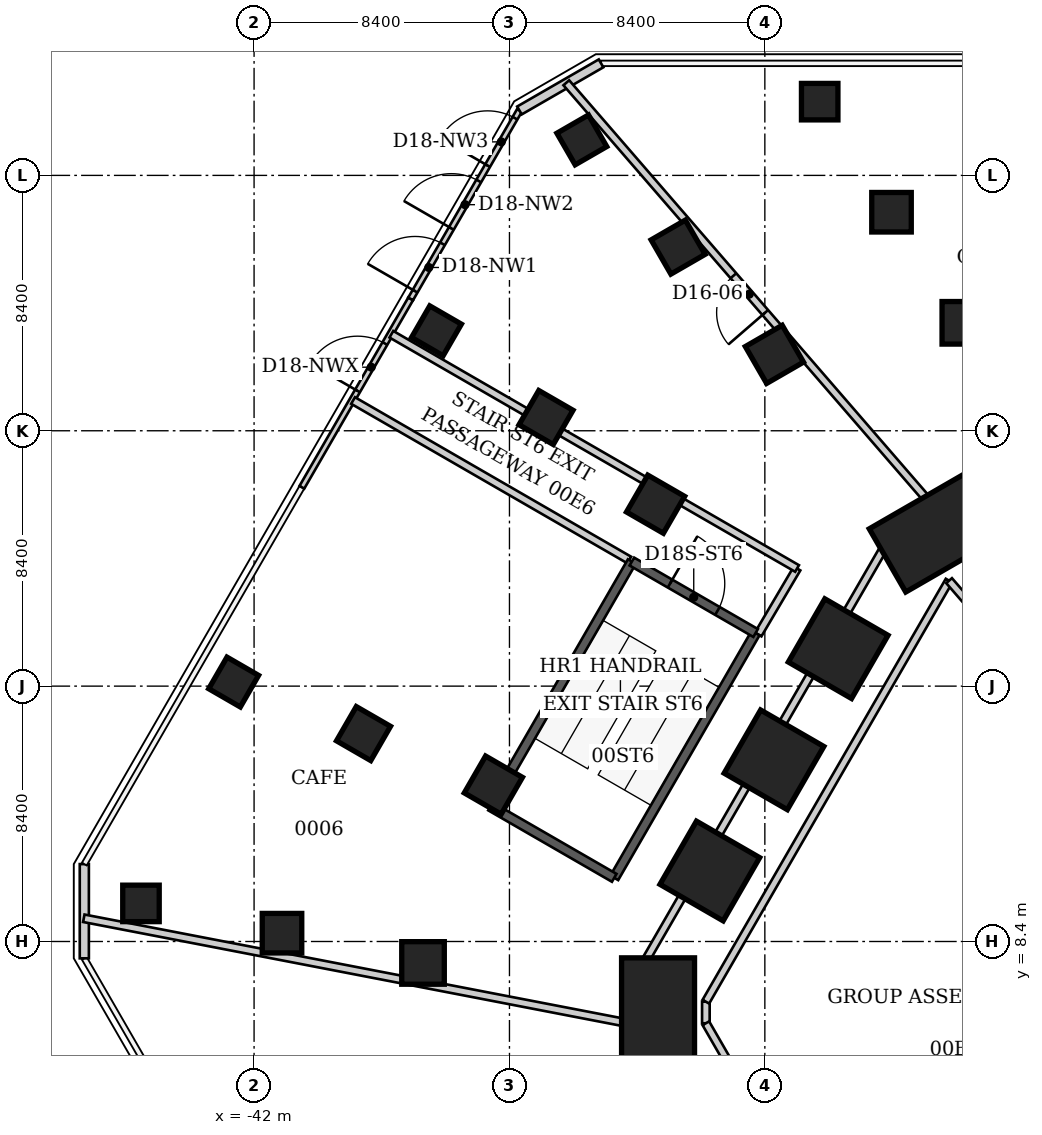
"""IFC4 building model, lengths in metres.
Left out: names, types, materials, properties, quantities, classifications, styles, units other than length and angle.
Written with IfcOpenShell. Run it as: python <this file> out.ifc"""

import sys

from ifc_helpers import new_model, si_unit, direction, frame, frame_2d, origin, origin_2d, place, context, subcontext, project, spatial, rectangle, extrude, element, fill, save


model = new_model("IFC4")
c1 = context("Model", 3, precision=1e-05, world=origin(), true_north=direction((0.0, 1.0)))
c2 = subcontext(c1, "Body", "Model", "MODEL_VIEW")
j1 = project(units=[si_unit("LENGTHUNIT", "METRE"), si_unit("PLANEANGLEUNIT", "RADIAN")], contexts=[c1])
p1 = place(None, origin())
s1 = spatial("IfcSite", under=j1, at=p1, CompositionType="ELEMENT")
p2 = place(p1, origin())
s2 = spatial("IfcBuilding", under=s1, at=p2, CompositionType="ELEMENT")
p3 = place(p2, origin())
s3 = spatial("IfcBuildingStorey", under=s2, at=p3, CompositionType="ELEMENT", Elevation=0.0)
p4 = place(p3, frame((-28.713, 6.062, -0.2), z_axis=(0.0, 0.0, 1.0), x_axis=(-1.0, 0.0, 0.0)))
e1 = element("IfcColumn", 1, at=p4, inside=s3, PredefinedType="COLUMN", context=c2, shape_type="SweptSolid", body=[
    extrude(rectangle(XDim=2.4, YDim=3.6, at=origin_2d()), origin(), (0.0, 0.0, 1.0), 6.2),
])
for number, where, z_axis, x_axis in (
    (2, (-27.01, 10.719, -0.2), (0.0, 0.0, 1.0), (-0.866, 0.5, 0.0)),
    (3, (-24.899, 14.375, -0.2), (0.0, 0.0, 1.0), (-0.866, 0.5, 0.0)),
    (4, (-22.788, 18.032, -0.2), (0.0, 0.0, 1.0), (-0.866, 0.5, 0.0)),
):
    element("IfcColumn", number, at=place(p3, frame(where, z_axis=z_axis, x_axis=x_axis)), inside=s3, PredefinedType="COLUMN", context=c2, shape_type="SweptSolid", body=[
        extrude(rectangle(XDim=2.4, YDim=2.4, at=origin_2d()), origin(), (0.0, 0.0, 1.0), 6.2),
    ])
p5 = place(p3, frame((-19.606, 21.835, -0.2), z_axis=(0.0, 0.0, 1.0), x_axis=(-0.5, 0.866025403784, 0.0)))
e5 = element("IfcColumn", 5, at=p5, inside=s3, PredefinedType="COLUMN", context=c2, shape_type="SweptSolid", body=[
    extrude(rectangle(XDim=2.4, YDim=3.6, at=origin_2d()), origin(), (0.0, 0.0, 1.0), 6.2),
])
for number, where, z_axis, x_axis in (
    (6, (-18.672, 28.751, -0.2), (0.0, 0.0, 1.0), (0.0, 1.0, 0.0)),
    (7, (-36.443, 7.694, -0.2), (0.0, 0.0, 1.0), (-1.0, 0.0, 0.0)),
    (8, (-34.129, 13.544, -0.2), (0.0, 0.0, 1.0), (-0.866, 0.5, 0.0)),
    (9, (-28.794, 22.785, -0.2), (0.0, 0.0, 1.0), (-0.866, 0.5, 0.0)),
    (10, (-24.885, 27.714, -0.2), (0.0, 0.0, 1.0), (-0.5, 0.866, 0.0)),
):
    element("IfcColumn", number, at=place(p3, frame(where, z_axis=z_axis, x_axis=x_axis)), inside=s3, PredefinedType="COLUMN", context=c2, shape_type="SweptSolid", body=[
        extrude(rectangle(XDim=1.4, YDim=1.4, at=origin_2d()), origin(), (0.0, 0.0, 1.0), 6.2),
    ])
for number, where, z_axis, x_axis in (
    (11, (-21.034, 32.388, -0.2), (0.0, 0.0, 1.0), (0.0, 1.0, 0.0)),
    (12, (-41.082, 8.674, -0.2), (0.0, 0.0, 1.0), (-1.0, 0.0, 0.0)),
    (13, (-38.4, 15.239, -0.2), (0.0, 0.0, 1.0), (-0.866, 0.5, 0.0)),
    (14, (-32.397, 25.636, -0.2), (0.0, 0.0, 1.0), (-0.866, 0.5, 0.0)),
    (15, (-28.052, 31.241, -0.2), (0.0, 0.0, 1.0), (-0.5, 0.866, 0.0)),
):
    element("IfcColumn", number, at=place(p3, frame(where, z_axis=z_axis, x_axis=x_axis)), inside=s3, PredefinedType="COLUMN", context=c2, shape_type="SweptSolid", body=[
        extrude(rectangle(XDim=1.3, YDim=1.3, at=origin_2d()), origin(), (0.0, 0.0, 1.0), 6.2),
    ])
for number, where, z_axis, x_axis in (
    (16, (-23.396, 36.025, -0.2), (0.0, 0.0, 1.0), (0.0, 1.0, 0.0)),
    (17, (-45.72, 9.653, -0.2), (0.0, 0.0, 1.0), (-1.0, 0.0, 0.0)),
    (18, (-42.672, 16.934, -0.2), (0.0, 0.0, 1.0), (-0.866, 0.5, 0.0)),
    (19, (-36.001, 28.488, -0.2), (0.0, 0.0, 1.0), (-0.866, 0.5, 0.0)),
    (20, (-31.22, 34.768, -0.2), (0.0, 0.0, 1.0), (-0.5, 0.866, 0.0)),
):
    element("IfcColumn", number, at=place(p3, frame(where, z_axis=z_axis, x_axis=x_axis)), inside=s3, PredefinedType="COLUMN", context=c2, shape_type="SweptSolid", body=[
        extrude(rectangle(XDim=1.2, YDim=1.2, at=origin_2d()), origin(), (0.0, 0.0, 1.0), 6.2),
    ])
p6 = place(p3, frame((-47.584, 7.846, 0.0), z_axis=(0.0, 0.0, 1.0), x_axis=(0.0, 1.0, 0.0)))
e21 = element("IfcWall", 21, at=p6, inside=s3, PredefinedType="SOLIDWALL", context=c2, shape_type="SweptSolid", body=[
    extrude(rectangle(XDim=3.1, YDim=0.3, at=frame_2d((1.55, 0.0))), origin(), (0.0, 0.0, 1.0), 5.84),
])
p7 = place(p3, frame((-40.428, 23.341, 0.0), z_axis=(0.0, 0.0, 1.0), x_axis=(0.49999906395, 0.866025944212, 0.0)))
e22 = element("IfcWall", 22, at=p7, inside=s3, PredefinedType="SOLIDWALL", context=c2, shape_type="SweptSolid", body=[
    extrude(rectangle(XDim=7.156, YDim=0.18, at=frame_2d((3.578, 0.0))), origin(), (0.0, 0.0, 1.0), 5.84),
])
p8 = place(p7, frame((3.661, 0.0, 0.0)))
e23 = element("IfcOpeningElement", 23, at=p8, cuts=e22, PredefinedType="OPENING", context=c2, shape_type="SweptSolid", body=[
    extrude(rectangle(XDim=1.8, YDim=2.7, at=frame_2d((0.9, 1.35))), frame((0.0, 0.09, 0.0), z_axis=(0.0, -1.0, 0.0), x_axis=(1.0, 0.0, 0.0)), (0.0, 0.0, 1.0), 0.18),
])
p9 = place(p3, frame((-36.85, 29.538, 0.0), z_axis=(0.0, 0.0, 1.0), x_axis=(0.499988249127, 0.866032188048, 0.0)))
e24 = element("IfcWall", 24, at=p9, inside=s3, PredefinedType="SOLIDWALL", context=c2, shape_type="SweptSolid", body=[
    extrude(rectangle(XDim=7.156, YDim=0.18, at=frame_2d((3.578, 0.0))), origin(), (0.0, 0.0, 1.0), 5.84),
])
p10 = place(p9, frame((0.293, 0.0, 0.0)))
e25 = element("IfcOpeningElement", 25, at=p10, cuts=e24, PredefinedType="OPENING", context=c2, shape_type="SweptSolid", body=[
    extrude(rectangle(XDim=1.8, YDim=2.7, at=frame_2d((0.9, 1.35))), frame((0.0, 0.09, 0.0), z_axis=(0.0, -1.0, 0.0), x_axis=(1.0, 0.0, 0.0)), (0.0, 0.0, 1.0), 0.18),
])
p11 = place(p9, frame((2.678, 0.0, 0.0)))
e26 = element("IfcOpeningElement", 26, at=p11, cuts=e24, PredefinedType="OPENING", context=c2, shape_type="SweptSolid", body=[
    extrude(rectangle(XDim=1.8, YDim=2.7, at=frame_2d((0.9, 1.35))), frame((0.0, 0.09, 0.0), z_axis=(0.0, -1.0, 0.0), x_axis=(1.0, 0.0, 0.0)), (0.0, 0.0, 1.0), 0.18),
])
p12 = place(p9, frame((5.063, 0.0, 0.0)))
e27 = element("IfcOpeningElement", 27, at=p12, cuts=e24, PredefinedType="OPENING", context=c2, shape_type="SweptSolid", body=[
    extrude(rectangle(XDim=1.8, YDim=2.7, at=frame_2d((0.9, 1.35))), frame((0.0, 0.09, 0.0), z_axis=(0.0, -1.0, 0.0), x_axis=(1.0, 0.0, 0.0)), (0.0, 0.0, 1.0), 0.18),
])
p13 = place(p3, frame((-33.272, 35.736, 0.0), z_axis=(0.0, 0.0, 1.0), x_axis=(0.866063626216, 0.499933790963, 0.0)))
e28 = element("IfcWall", 28, at=p13, inside=s3, PredefinedType="SOLIDWALL", context=c2, shape_type="SweptSolid", body=[
    extrude(rectangle(XDim=3.1, YDim=0.3, at=frame_2d((1.55, 0.0))), origin(), (0.0, 0.0, 1.0), 5.84),
])
p14 = place(p3, frame((-29.659, 20.948, 0.0), z_axis=(0.0, 0.0, 1.0), x_axis=(-0.865956906552, 0.500118621924, 0.0)))
e29 = element("IfcWall", 29, at=p14, inside=s3, PredefinedType="PARTITIONING", context=c2, shape_type="SweptSolid", body=[
    extrude(rectangle(XDim=10.491, YDim=0.25, at=frame_2d((5.245, 0.0))), origin(), (0.0, 0.0, 1.0), 5.75),
])
p15 = place(p3, frame((-29.54, 5.06, 0.0), z_axis=(0.0, 0.0, 1.0), x_axis=(0.500237574973, -0.865888196354, 0.0)))
e30 = element("IfcWall", 30, at=p15, inside=s3, PredefinedType="PARTITIONING", context=c2, shape_type="SweptSolid", body=[
    extrude(rectangle(XDim=15.753, YDim=0.25, at=frame_2d((7.876, 0.0))), origin(), (0.0, 0.0, 1.0), 4.04),
])
p16 = place(p15, frame((5.726, 0.0, 0.0)))
e31 = element("IfcOpeningElement", 31, at=p16, cuts=e30, PredefinedType="OPENING", context=c2, shape_type="SweptSolid", body=[
    extrude(rectangle(XDim=1.6, YDim=2.4, at=frame_2d((0.8, 1.2))), frame((0.0, 0.125, 0.0), z_axis=(0.0, -1.0, 0.0), x_axis=(1.0, 0.0, 0.0)), (0.0, 0.0, 1.0), 0.25),
])
p17 = place(p3, frame((-29.54, 5.645, 0.0), z_axis=(0.0, 0.0, 1.0), x_axis=(0.0, -1.0, 0.0)))
e32 = element("IfcWall", 32, at=p17, inside=s3, PredefinedType="PARTITIONING", context=c2, shape_type="SweptSolid", body=[
    extrude(rectangle(XDim=0.585, YDim=0.25, at=frame_2d((0.292, 0.0))), origin(), (0.0, 0.0, 1.0), 5.84),
])
p18 = place(p3, frame((-29.54, 5.68, 0.0), z_axis=(0.0, 0.0, 1.0), x_axis=(-0.981893421599, 0.189434180181, 0.0)))
e33 = element("IfcWall", 33, at=p18, inside=s3, PredefinedType="PARTITIONING", context=c2, shape_type="SweptSolid", body=[
    extrude(rectangle(XDim=18.394, YDim=0.25, at=frame_2d((9.197, 0.0))), origin(), (0.0, 0.0, 1.0), 5.75),
])
p19 = place(p3, frame((-29.54, 7.06, 0.0), z_axis=(0.0, 0.0, 1.0), x_axis=(0.0, -1.0, 0.0)))
e34 = element("IfcWall", 34, at=p19, inside=s3, PredefinedType="PARTITIONING", context=c2, shape_type="SweptSolid", body=[
    extrude(rectangle(XDim=1.38, YDim=0.25, at=frame_2d((0.69, 0.0))), origin(), (0.0, 0.0, 1.0), 5.84),
])
p20 = place(p3, frame((-27.14, 5.71, 0.0), z_axis=(0.0, 0.0, 1.0), x_axis=(0.0, 1.0, 0.0)))
e35 = element("IfcWall", 35, at=p20, inside=s3, PredefinedType="PARTITIONING", context=c2, shape_type="SweptSolid", body=[
    extrude(rectangle(XDim=0.71, YDim=0.25, at=frame_2d((0.355, 0.0))), origin(), (0.0, 0.0, 1.0), 5.84),
])
p21 = place(p3, frame((-27.14, 5.71, 0.0), z_axis=(0.0, 0.0, 1.0), x_axis=(0.499871788402, -0.866099414132, 0.0)))
e36 = element("IfcWall", 36, at=p21, inside=s3, PredefinedType="PARTITIONING", context=c2, shape_type="SweptSolid", body=[
    extrude(rectangle(XDim=23.257, YDim=0.25, at=frame_2d((11.628, 0.0))), origin(), (0.0, 0.0, 1.0), 5.84),
])
p22 = place(p21, frame((9.979, 0.0, 0.0)))
e37 = element("IfcOpeningElement", 37, at=p22, cuts=e36, PredefinedType="OPENING", context=c2, shape_type="SweptSolid", body=[
    extrude(rectangle(XDim=1.6, YDim=2.4, at=frame_2d((0.8, 1.2))), frame((0.0, 0.125, 0.0), z_axis=(0.0, -1.0, 0.0), x_axis=(1.0, 0.0, 0.0)), (0.0, 0.0, 1.0), 0.25),
])
p23 = place(p3, frame((-27.14, 6.42, 0.0), z_axis=(0.0, 0.0, 1.0), x_axis=(0.50017078562, 0.865926778205, 0.0)))
e38 = element("IfcWall", 38, at=p23, inside=s3, PredefinedType="PARTITIONING", context=c2, shape_type="SweptSolid", body=[
    extrude(rectangle(XDim=15.995, YDim=0.25, at=frame_2d((7.997, 0.0))), origin(), (0.0, 0.0, 1.0), 5.84),
])
p24 = place(p3, frame((-25.42, 18.5, 0.0), z_axis=(0.0, 0.0, 1.0), x_axis=(0.508082727165, 0.861308273707, 0.0)))
e39 = element("IfcWall", 39, at=p24, inside=s3, PredefinedType="PARTITIONING", context=c2, shape_type="SweptSolid", body=[
    extrude(rectangle(XDim=2.519, YDim=0.25, at=frame_2d((1.26, 0.0))), origin(), (0.0, 0.0, 1.0), 5.84),
])
p25 = place(p3, frame((-24.14, 20.67, 0.0), z_axis=(0.0, 0.0, 1.0), x_axis=(-0.866003524369, 0.500037894345, 0.0)))
e40 = element("IfcWall", 40, at=p25, inside=s3, PredefinedType="PARTITIONING", context=c2, shape_type="SweptSolid", body=[
    extrude(rectangle(XDim=15.409, YDim=0.25, at=frame_2d((7.705, 0.0))), origin(), (0.0, 0.0, 1.0), 5.083),
])
p26 = place(p3, frame((-20.88, 22.05, 0.0), z_axis=(0.0, 0.0, 1.0), x_axis=(-0.500246113481, -0.865883263464, 0.0)))
e41 = element("IfcWall", 41, at=p26, inside=s3, PredefinedType="PARTITIONING", context=c2, shape_type="SweptSolid", body=[
    extrude(rectangle(XDim=17.312, YDim=0.25, at=frame_2d((8.656, 0.0))), origin(), (0.0, 0.0, 1.0), 4.04),
])
p27 = place(p3, frame((-20.88, 22.05, 0.0), z_axis=(0.0, 0.0, 1.0), x_axis=(0.865786487168, 0.500413587582, 0.0)))
e42 = element("IfcWall", 42, at=p27, inside=s3, PredefinedType="PARTITIONING", context=c2, shape_type="SweptSolid", body=[
    extrude(rectangle(XDim=1.376, YDim=0.25, at=frame_2d((0.688, 0.0))), origin(), (0.0, 0.0, 1.0), 5.84),
])
p28 = place(p3, frame((-19.69, 22.74, 0.0), z_axis=(0.0, 0.0, 1.0), x_axis=(-0.654545432473, 0.75602266952, 0.0)))
e43 = element("IfcWall", 43, at=p28, inside=s3, PredefinedType="PARTITIONING", context=c2, shape_type="SweptSolid", body=[
    extrude(rectangle(XDim=18.395, YDim=0.25, at=frame_2d((9.198, 0.0))), origin(), (0.0, 0.0, 1.0), 5.75),
])
p29 = place(p28, frame((8.398, 0.0, 0.0)))
e44 = element("IfcOpeningElement", 44, at=p29, cuts=e43, PredefinedType="OPENING", context=c2, shape_type="SweptSolid", body=[
    extrude(rectangle(XDim=1.6, YDim=2.4, at=frame_2d((0.8, 1.2))), frame((0.0, 0.125, 0.0), z_axis=(0.0, -1.0, 0.0), x_axis=(1.0, 0.0, 0.0)), (0.0, 0.0, 1.0), 0.25),
])
p30 = place(p3, frame((-19.66, 22.757, 0.0), z_axis=(0.0, 0.0, 1.0), x_axis=(0.867193315, 0.497971640175, 0.0)))
e45 = element("IfcWall", 45, at=p30, inside=s3, PredefinedType="PARTITIONING", context=c2, shape_type="SweptSolid", body=[
    extrude(rectangle(XDim=0.588, YDim=0.25, at=frame_2d((0.294, 0.0))), origin(), (0.0, 0.0, 1.0), 5.84),
])
p31 = place(p3, frame((-19.14, 20.27, 0.0), z_axis=(0.0, 0.0, 1.0), x_axis=(0.654785227324, -0.755814994611, 0.0)))
e46 = element("IfcWall", 46, at=p31, inside=s3, PredefinedType="PARTITIONING", context=c2, shape_type="SweptSolid", body=[
    extrude(rectangle(XDim=13.562, YDim=0.25, at=frame_2d((6.781, 0.0))), origin(), (0.0, 0.0, 1.0), 5.84),
])
p32 = place(p3, frame((-4.0, 23.05, 0.0), z_axis=(0.0, 0.0, 1.0), x_axis=(-1.0, 0.0, 0.0)))
e47 = element("IfcWall", 47, at=p32, inside=s3, PredefinedType="PARTITIONING", context=c2, shape_type="SweptSolid", body=[
    extrude(rectangle(XDim=15.15, YDim=0.25, at=frame_2d((7.575, 0.0))), origin(), (0.0, 0.0, 1.0), 4.04),
])
p33 = place(p3, frame((-25.504, 18.548, 0.0), z_axis=(0.0, 0.0, 1.0), x_axis=(-0.500004225487, -0.866022964185, 0.0)))
e48 = element("IfcWall", 48, at=p33, inside=s3, PredefinedType="SHEAR", context=c2, shape_type="SweptSolid", body=[
    extrude(rectangle(XDim=9.3, YDim=0.3, at=frame_2d((4.65, 0.0))), origin(), (0.0, 0.0, 1.0), 6.0),
])
p34 = place(p3, frame((-30.154, 10.494, 0.0), z_axis=(0.0, 0.0, 1.0), x_axis=(-0.866016039709, 0.500016218704, 0.0)))
e49 = element("IfcWall", 49, at=p34, inside=s3, PredefinedType="SHEAR", context=c2, shape_type="SweptSolid", body=[
    extrude(rectangle(XDim=4.7, YDim=0.3, at=frame_2d((2.35, 0.0))), origin(), (0.0, 0.0, 1.0), 6.0),
])
p35 = place(p3, frame((-34.224, 12.844, 0.0), z_axis=(0.0, 0.0, 1.0), x_axis=(0.500015592816, 0.866016401081, 0.0)))
e50 = element("IfcWall", 50, at=p35, inside=s3, PredefinedType="SHEAR", context=c2, shape_type="SweptSolid", body=[
    extrude(rectangle(XDim=9.3, YDim=0.3, at=frame_2d((4.65, 0.0))), origin(), (0.0, 0.0, 1.0), 6.0),
])
p36 = place(p3, frame((-29.574, 20.898, 0.0), z_axis=(0.0, 0.0, 1.0), x_axis=(0.866038532462, -0.499977259774, 0.0)))
e51 = element("IfcWall", 51, at=p36, inside=s3, PredefinedType="SHEAR", context=c2, shape_type="SweptSolid", body=[
    extrude(rectangle(XDim=4.7, YDim=0.3, at=frame_2d((2.35, 0.0))), origin(), (0.0, 0.0, 1.0), 6.0),
])
p37 = place(p36, frame((1.45, 0.0, 0.0)))
e52 = element("IfcOpeningElement", 52, at=p37, cuts=e51, PredefinedType="OPENING", context=c2, shape_type="SweptSolid", body=[
    extrude(rectangle(XDim=1.8, YDim=2.4, at=frame_2d((0.9, 1.2))), frame((0.0, 0.15, 0.0), z_axis=(0.0, -1.0, 0.0), x_axis=(1.0, 0.0, 0.0)), (0.0, 0.0, 1.0), 0.3),
])
p38 = place(p8, origin())
e53 = element("IfcDoor", 53, at=p38, inside=s3, OperationType="SINGLE_SWING_LEFT", PredefinedType="DOOR", context=c2, shape_type="SweptSolid", body=[
    extrude(rectangle(XDim=1.8, YDim=2.7, at=frame_2d((0.9, 1.35))), frame((0.0, 0.025, 0.0), z_axis=(0.0, -1.0, 0.0), x_axis=(1.0, 0.0, 0.0)), (0.0, 0.0, 1.0), 0.05),
])
fill(e23, e53)
p39 = place(p10, origin())
e54 = element("IfcDoor", 54, at=p39, inside=s3, OperationType="SINGLE_SWING_LEFT", PredefinedType="DOOR", context=c2, shape_type="SweptSolid", body=[
    extrude(rectangle(XDim=1.8, YDim=2.7, at=frame_2d((0.9, 1.35))), frame((0.0, 0.025, 0.0), z_axis=(0.0, -1.0, 0.0), x_axis=(1.0, 0.0, 0.0)), (0.0, 0.0, 1.0), 0.05),
])
fill(e25, e54)
p40 = place(p11, origin())
e55 = element("IfcDoor", 55, at=p40, inside=s3, OperationType="SINGLE_SWING_LEFT", PredefinedType="DOOR", context=c2, shape_type="SweptSolid", body=[
    extrude(rectangle(XDim=1.8, YDim=2.7, at=frame_2d((0.9, 1.35))), frame((0.0, 0.025, 0.0), z_axis=(0.0, -1.0, 0.0), x_axis=(1.0, 0.0, 0.0)), (0.0, 0.0, 1.0), 0.05),
])
fill(e26, e55)
p41 = place(p12, origin())
e56 = element("IfcDoor", 56, at=p41, inside=s3, OperationType="SINGLE_SWING_LEFT", PredefinedType="DOOR", context=c2, shape_type="SweptSolid", body=[
    extrude(rectangle(XDim=1.8, YDim=2.7, at=frame_2d((0.9, 1.35))), frame((0.0, 0.025, 0.0), z_axis=(0.0, -1.0, 0.0), x_axis=(1.0, 0.0, 0.0)), (0.0, 0.0, 1.0), 0.05),
])
fill(e27, e56)
p42 = place(p29, origin())
e57 = element("IfcDoor", 57, at=p42, inside=s3, OperationType="DOUBLE_DOOR_SINGLE_SWING", PredefinedType="DOOR", context=c2, shape_type="SweptSolid", body=[
    extrude(rectangle(XDim=1.6, YDim=2.4, at=frame_2d((0.8, 1.2))), frame((0.0, 0.025, 0.0), z_axis=(0.0, -1.0, 0.0), x_axis=(1.0, 0.0, 0.0)), (0.0, 0.0, 1.0), 0.05),
])
fill(e44, e57)
p43 = place(p37, origin())
e58 = element("IfcDoor", 58, at=p43, inside=s3, OperationType="DOUBLE_DOOR_SINGLE_SWING", PredefinedType="DOOR", context=c2, shape_type="SweptSolid", body=[
    extrude(rectangle(XDim=1.8, YDim=2.4, at=frame_2d((0.9, 1.2))), frame((0.0, 0.025, 0.0), z_axis=(0.0, -1.0, 0.0), x_axis=(1.0, 0.0, 0.0)), (0.0, 0.0, 1.0), 0.05),
])
fill(e52, e58)
save(model, sys.argv[1])
